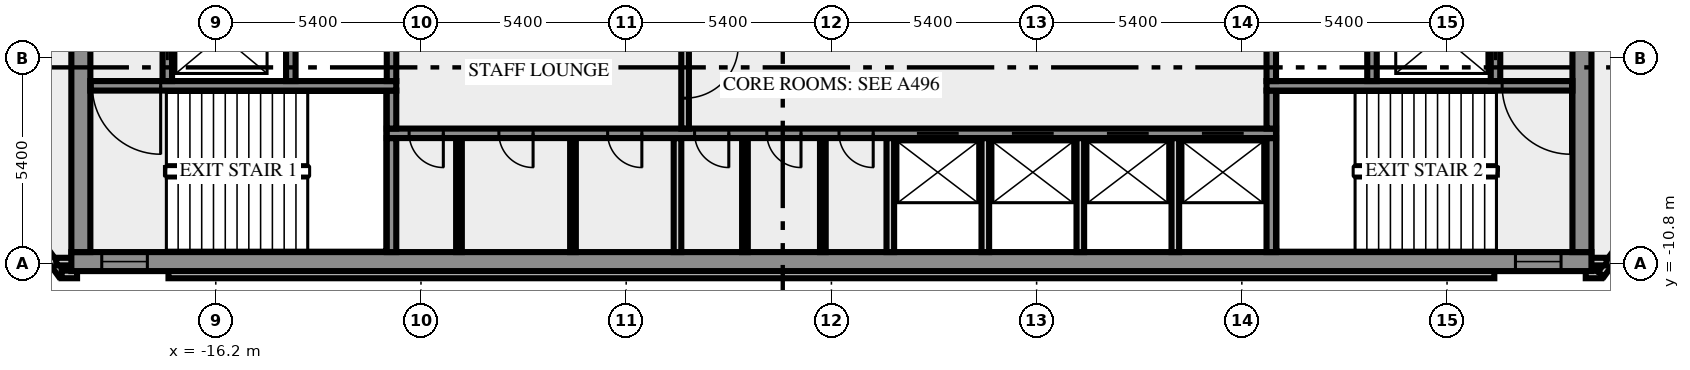
"""IFC4 building model, lengths in metres.
Left out: names, types, materials, properties, quantities, classifications, styles, units other than length and angle.
Written with IfcOpenShell. Run it as: python <this file> out.ifc"""

import sys

from ifc_helpers import new_model, si_unit, direction, frame, frame_2d, origin, place, context, subcontext, project, spatial, rectangle, extrude, element, fill, save


model = new_model("IFC4")
c1 = context("Model", 3, precision=1e-05, world=origin(), true_north=direction((0.0, 1.0)))
c2 = subcontext(c1, "Body", "Model", "MODEL_VIEW")
j1 = project(units=[si_unit("LENGTHUNIT", "METRE"), si_unit("PLANEANGLEUNIT", "RADIAN")], contexts=[c1])
p1 = place(None, origin())
s1 = spatial("IfcSite", under=j1, at=p1, CompositionType="ELEMENT")
p2 = place(p1, origin())
s2 = spatial("IfcBuilding", under=s1, at=p2, CompositionType="ELEMENT")
p3 = place(p2, frame((0.0, 0.0, 218.0)))
s3 = spatial("IfcBuildingStorey", under=s2, at=p3, CompositionType="ELEMENT", Elevation=218.0)
p4 = place(p3, frame((-21.833, -8.909, 0.0), z_axis=(0.0, 0.0, 1.0), x_axis=(0.587766567315, -0.809030569476, 0.0)))
e1 = element("IfcWall", 1, at=p4, inside=s3, PredefinedType="SOLIDWALL", context=c2, shape_type="SweptSolid", body=[
    extrude(rectangle(XDim=2.688, YDim=0.2, at=frame_2d((1.344, 0.0))), origin(), (0.0, 0.0, 1.0), 3.65),
])
p5 = place(p3, frame((-20.256, -11.088, 0.0), z_axis=(0.0, 0.0, 1.0), x_axis=(1.0, 0.0, 0.0)))
e2 = element("IfcWall", 2, at=p5, inside=s3, PredefinedType="SOLIDWALL", context=c2, shape_type="SweptSolid", body=[
    extrude(rectangle(XDim=0.406, YDim=0.2, at=frame_2d((0.203, 0.0))), origin(), (0.0, 0.0, 1.0), 3.65),
])
p6 = place(p3, frame((-17.444, -11.088, 0.0), z_axis=(0.0, 0.0, 1.0), x_axis=(1.0, 0.0, 0.0)))
e3 = element("IfcWall", 3, at=p6, inside=s3, PredefinedType="SOLIDWALL", context=c2, shape_type="SweptSolid", body=[
    extrude(rectangle(XDim=34.888, YDim=0.2, at=frame_2d((17.444, 0.0))), origin(), (0.0, 0.0, 1.0), 3.65),
])
p7 = place(p3, frame((19.85, -11.088, 0.0), z_axis=(0.0, 0.0, 1.0), x_axis=(1.0, 0.0, 0.0)))
e4 = element("IfcWall", 4, at=p7, inside=s3, PredefinedType="SOLIDWALL", context=c2, shape_type="SweptSolid", body=[
    extrude(rectangle(XDim=0.406, YDim=0.2, at=frame_2d((0.203, 0.0))), origin(), (0.0, 0.0, 1.0), 3.65),
])
p8 = place(p3, frame((20.253, -11.083, 0.0), z_axis=(0.0, 0.0, 1.0), x_axis=(0.587766567315, 0.809030569476, 0.0)))
e5 = element("IfcWall", 5, at=p8, inside=s3, PredefinedType="SOLIDWALL", context=c2, shape_type="SweptSolid", body=[
    extrude(rectangle(XDim=2.688, YDim=0.2, at=frame_2d((1.344, 0.0))), origin(), (0.0, 0.0, 1.0), 3.65),
])
for number, where, z_axis, x_axis in (
    (6, (-19.98, -10.75, 0.0), (0.0, 0.0, 1.0), (-1.0, 0.0, 0.0)),
    (7, (19.98, -10.75, 0.0), (0.0, 0.0, 1.0), (1.0, 0.0, 0.0)),
):
    element("IfcWall", number, at=place(p3, frame(where, z_axis=z_axis, x_axis=x_axis)), inside=s3, PredefinedType="SOLIDWALL", context=c2, shape_type="SweptSolid", body=[
        extrude(rectangle(XDim=0.417, YDim=0.2, at=frame_2d((0.208, 0.0))), origin(), (0.0, 0.0, 1.0), 3.65),
    ])
p9 = place(p3, frame((-20.0, -10.75, 0.0), z_axis=(0.0, 0.0, 1.0), x_axis=(1.0, 0.0, 0.0)))
e8 = element("IfcWall", 8, at=p9, inside=s3, PredefinedType="SHEAR", context=c2, shape_type="SweptSolid", body=[
    extrude(rectangle(XDim=40.0, YDim=0.5, at=frame_2d((20.0, 0.0))), origin(), (0.0, 0.0, 1.0), 3.65),
])
p10 = place(p9, frame((0.8, 0.0, 1.0)))
e9 = element("IfcOpeningElement", 9, at=p10, cuts=e8, PredefinedType="OPENING", context=c2, shape_type="SweptSolid", body=[
    extrude(rectangle(XDim=1.2, YDim=1.2, at=frame_2d((0.6, 0.6))), frame((0.0, 0.26, 0.0), z_axis=(0.0, -1.0, 0.0), x_axis=(1.0, 0.0, 0.0)), (0.0, 0.0, 1.0), 0.52),
])
p11 = place(p9, frame((38.0, 0.0, 1.0)))
e10 = element("IfcOpeningElement", 10, at=p11, cuts=e8, PredefinedType="OPENING", context=c2, shape_type="SweptSolid", body=[
    extrude(rectangle(XDim=1.2, YDim=1.2, at=frame_2d((0.6, 0.6))), frame((0.0, 0.26, 0.0), z_axis=(0.0, -1.0, 0.0), x_axis=(1.0, 0.0, 0.0)), (0.0, 0.0, 1.0), 0.52),
])
p12 = place(p3, frame((-19.75, -10.5, 0.0), z_axis=(0.0, 0.0, 1.0), x_axis=(0.0, 1.0, 0.0)))
e11 = element("IfcWall", 11, at=p12, inside=s3, PredefinedType="SHEAR", context=c2, shape_type="SweptSolid", body=[
    extrude(rectangle(XDim=8.8, YDim=0.5, at=frame_2d((4.4, 0.0))), origin(), (0.0, 0.0, 1.0), 3.65),
])
p13 = place(p3, frame((-11.575, -10.5, 0.0), z_axis=(0.0, 0.0, 1.0), x_axis=(0.0, 1.0, 0.0)))
e12 = element("IfcWall", 12, at=p13, inside=s3, PredefinedType="SHEAR", context=c2, shape_type="SweptSolid", body=[
    extrude(rectangle(XDim=3.0, YDim=0.25, at=frame_2d((1.5, 0.0))), origin(), (0.0, 0.0, 1.0), 3.65),
])
for number, where, z_axis, x_axis in (
    (13, (-9.8, -10.5, 0.0), (0.0, 0.0, 1.0), (0.0, 1.0, 0.0)),
    (14, (-6.8, -10.5, 0.0), (0.0, 0.0, 1.0), (0.0, 1.0, 0.0)),
):
    element("IfcWall", number, at=place(p3, frame(where, z_axis=z_axis, x_axis=x_axis)), inside=s3, PredefinedType="PARTITIONING", context=c2, shape_type="SweptSolid", body=[
        extrude(rectangle(XDim=3.0, YDim=0.15, at=frame_2d((1.5, 0.0))), origin(), (0.0, 0.0, 1.0), 3.65),
    ])
p14 = place(p3, frame((-4.05, -10.5, 0.0), z_axis=(0.0, 0.0, 1.0), x_axis=(0.0, 1.0, 0.0)))
e15 = element("IfcWall", 15, at=p14, inside=s3, PredefinedType="SOLIDWALL", context=c2, shape_type="SweptSolid", body=[
    extrude(rectangle(XDim=3.0, YDim=0.2, at=frame_2d((1.5, 0.0))), origin(), (0.0, 0.0, 1.0), 3.65),
])
for number, where, z_axis, x_axis in (
    (16, (-2.275, -10.5, 0.0), (0.0, 0.0, 1.0), (0.0, 1.0, 0.0)),
    (17, (-0.225, -10.5, 0.0), (0.0, 0.0, 1.0), (0.0, 1.0, 0.0)),
):
    element("IfcWall", number, at=place(p3, frame(where, z_axis=z_axis, x_axis=x_axis)), inside=s3, PredefinedType="PARTITIONING", context=c2, shape_type="SweptSolid", body=[
        extrude(rectangle(XDim=3.0, YDim=0.15, at=frame_2d((1.5, 0.0))), origin(), (0.0, 0.0, 1.0), 3.65),
    ])
for number, where, z_axis, x_axis in (
    (18, (1.55, -10.5, 0.0), (0.0, 0.0, 1.0), (0.0, 1.0, 0.0)),
    (19, (4.05, -10.5, 0.0), (0.0, 0.0, 1.0), (0.0, 1.0, 0.0)),
    (20, (6.55, -10.5, 0.0), (0.0, 0.0, 1.0), (0.0, 1.0, 0.0)),
    (21, (9.05, -10.5, 0.0), (0.0, 0.0, 1.0), (0.0, 1.0, 0.0)),
):
    element("IfcWall", number, at=place(p3, frame(where, z_axis=z_axis, x_axis=x_axis)), inside=s3, PredefinedType="SOLIDWALL", context=c2, shape_type="SweptSolid", body=[
        extrude(rectangle(XDim=3.0, YDim=0.2, at=frame_2d((1.5, 0.0))), origin(), (0.0, 0.0, 1.0), 3.65),
    ])
p15 = place(p3, frame((11.575, -10.5, 0.0), z_axis=(0.0, 0.0, 1.0), x_axis=(0.0, 1.0, 0.0)))
e22 = element("IfcWall", 22, at=p15, inside=s3, PredefinedType="SHEAR", context=c2, shape_type="SweptSolid", body=[
    extrude(rectangle(XDim=3.0, YDim=0.25, at=frame_2d((1.5, 0.0))), origin(), (0.0, 0.0, 1.0), 3.65),
])
p16 = place(p3, frame((19.75, -10.5, 0.0), z_axis=(0.0, 0.0, 1.0), x_axis=(0.0, 1.0, 0.0)))
e23 = element("IfcWall", 23, at=p16, inside=s3, PredefinedType="SHEAR", context=c2, shape_type="SweptSolid", body=[
    extrude(rectangle(XDim=8.8, YDim=0.5, at=frame_2d((4.4, 0.0))), origin(), (0.0, 0.0, 1.0), 3.65),
])
p17 = place(p3, frame((11.7, -7.375, 0.0), z_axis=(0.0, 0.0, 1.0), x_axis=(-1.0, 0.0, 0.0)))
e24 = element("IfcWall", 24, at=p17, inside=s3, PredefinedType="SHEAR", context=c2, shape_type="SweptSolid", body=[
    extrude(rectangle(XDim=23.4, YDim=0.25, at=frame_2d((11.7, 0.0))), origin(), (0.0, 0.0, 1.0), 3.65),
])
p18 = place(p17, frame((21.912, 0.0, 0.0)))
e25 = element("IfcOpeningElement", 25, at=p18, cuts=e24, PredefinedType="OPENING", context=c2, shape_type="SweptSolid", body=[
    extrude(rectangle(XDim=0.9, YDim=2.1, at=frame_2d((0.45, 1.05))), frame((0.0, 0.135, 0.0), z_axis=(0.0, -1.0, 0.0), x_axis=(1.0, 0.0, 0.0)), (0.0, 0.0, 1.0), 0.27),
])
p19 = place(p17, frame((19.55, 0.0, 0.0)))
e26 = element("IfcOpeningElement", 26, at=p19, cuts=e24, PredefinedType="OPENING", context=c2, shape_type="SweptSolid", body=[
    extrude(rectangle(XDim=0.9, YDim=2.1, at=frame_2d((0.45, 1.05))), frame((0.0, 0.135, 0.0), z_axis=(0.0, -1.0, 0.0), x_axis=(1.0, 0.0, 0.0)), (0.0, 0.0, 1.0), 0.27),
])
p20 = place(p17, frame((16.688, 0.0, 0.0)))
e27 = element("IfcOpeningElement", 27, at=p20, cuts=e24, PredefinedType="OPENING", context=c2, shape_type="SweptSolid", body=[
    extrude(rectangle(XDim=0.9, YDim=2.1, at=frame_2d((0.45, 1.05))), frame((0.0, 0.135, 0.0), z_axis=(0.0, -1.0, 0.0), x_axis=(1.0, 0.0, 0.0)), (0.0, 0.0, 1.0), 0.27),
])
p21 = place(p17, frame((14.4, 0.0, 0.0)))
e28 = element("IfcOpeningElement", 28, at=p21, cuts=e24, PredefinedType="OPENING", context=c2, shape_type="SweptSolid", body=[
    extrude(rectangle(XDim=0.9, YDim=2.1, at=frame_2d((0.45, 1.05))), frame((0.0, 0.135, 0.0), z_axis=(0.0, -1.0, 0.0), x_axis=(1.0, 0.0, 0.0)), (0.0, 0.0, 1.0), 0.27),
])
p22 = place(p17, frame((12.5, 0.0, 0.0)))
e29 = element("IfcOpeningElement", 29, at=p22, cuts=e24, PredefinedType="OPENING", context=c2, shape_type="SweptSolid", body=[
    extrude(rectangle(XDim=0.9, YDim=2.1, at=frame_2d((0.45, 1.05))), frame((0.0, 0.135, 0.0), z_axis=(0.0, -1.0, 0.0), x_axis=(1.0, 0.0, 0.0)), (0.0, 0.0, 1.0), 0.27),
])
p23 = place(p17, frame((10.6, 0.0, 0.0)))
e30 = element("IfcOpeningElement", 30, at=p23, cuts=e24, PredefinedType="OPENING", context=c2, shape_type="SweptSolid", body=[
    extrude(rectangle(XDim=0.9, YDim=2.1, at=frame_2d((0.45, 1.05))), frame((0.0, 0.135, 0.0), z_axis=(0.0, -1.0, 0.0), x_axis=(1.0, 0.0, 0.0)), (0.0, 0.0, 1.0), 0.27),
])
p24 = place(p17, frame((8.35, 0.0, 0.0)))
e31 = element("IfcOpeningElement", 31, at=p24, cuts=e24, PredefinedType="OPENING", context=c2, shape_type="SweptSolid", body=[
    extrude(rectangle(XDim=1.1, YDim=2.1, at=frame_2d((0.55, 1.05))), frame((0.0, 0.135, 0.0), z_axis=(0.0, -1.0, 0.0), x_axis=(1.0, 0.0, 0.0)), (0.0, 0.0, 1.0), 0.27),
])
p25 = place(p17, frame((5.85, 0.0, 0.0)))
e32 = element("IfcOpeningElement", 32, at=p25, cuts=e24, PredefinedType="OPENING", context=c2, shape_type="SweptSolid", body=[
    extrude(rectangle(XDim=1.1, YDim=2.1, at=frame_2d((0.55, 1.05))), frame((0.0, 0.135, 0.0), z_axis=(0.0, -1.0, 0.0), x_axis=(1.0, 0.0, 0.0)), (0.0, 0.0, 1.0), 0.27),
])
p26 = place(p17, frame((3.35, 0.0, 0.0)))
e33 = element("IfcOpeningElement", 33, at=p26, cuts=e24, PredefinedType="OPENING", context=c2, shape_type="SweptSolid", body=[
    extrude(rectangle(XDim=1.1, YDim=2.1, at=frame_2d((0.55, 1.05))), frame((0.0, 0.135, 0.0), z_axis=(0.0, -1.0, 0.0), x_axis=(1.0, 0.0, 0.0)), (0.0, 0.0, 1.0), 0.27),
])
p27 = place(p17, frame((0.85, 0.0, 0.0)))
e34 = element("IfcOpeningElement", 34, at=p27, cuts=e24, PredefinedType="OPENING", context=c2, shape_type="SweptSolid", body=[
    extrude(rectangle(XDim=1.1, YDim=2.1, at=frame_2d((0.55, 1.05))), frame((0.0, 0.135, 0.0), z_axis=(0.0, -1.0, 0.0), x_axis=(1.0, 0.0, 0.0)), (0.0, 0.0, 1.0), 0.27),
])
p28 = place(p3, frame((-11.575, -7.25, 0.0), z_axis=(0.0, 0.0, 1.0), x_axis=(0.0, 1.0, 0.0)))
e35 = element("IfcWall", 35, at=p28, inside=s3, PredefinedType="SHEAR", context=c2, shape_type="SweptSolid", body=[
    extrude(rectangle(XDim=1.0, YDim=0.25, at=frame_2d((0.5, 0.0))), origin(), (0.0, 0.0, 1.0), 3.65),
])
p29 = place(p3, frame((-3.85, -4.25, 0.0), z_axis=(0.0, 0.0, 1.0), x_axis=(0.0, -1.0, 0.0)))
e36 = element("IfcWall", 36, at=p29, inside=s3, PredefinedType="SOLIDWALL", context=c2, shape_type="SweptSolid", body=[
    extrude(rectangle(XDim=3.0, YDim=0.2, at=frame_2d((1.5, 0.0))), origin(), (0.0, 0.0, 1.0), 3.65),
])
p30 = place(p29, frame((0.8, 0.0, 0.0)))
e37 = element("IfcOpeningElement", 37, at=p30, cuts=e36, PredefinedType="OPENING", context=c2, shape_type="SweptSolid", body=[
    extrude(rectangle(XDim=1.4, YDim=2.1, at=frame_2d((0.7, 1.05))), frame((0.0, 0.11, 0.0), z_axis=(0.0, -1.0, 0.0), x_axis=(1.0, 0.0, 0.0)), (0.0, 0.0, 1.0), 0.22),
])
p31 = place(p3, frame((11.575, -7.25, 0.0), z_axis=(0.0, 0.0, 1.0), x_axis=(0.0, 1.0, 0.0)))
e38 = element("IfcWall", 38, at=p31, inside=s3, PredefinedType="SHEAR", context=c2, shape_type="SweptSolid", body=[
    extrude(rectangle(XDim=1.0, YDim=0.25, at=frame_2d((0.5, 0.0))), origin(), (0.0, 0.0, 1.0), 3.65),
])
p32 = place(p3, frame((-11.45, -6.125, 0.0), z_axis=(0.0, 0.0, 1.0), x_axis=(-1.0, 0.0, 0.0)))
e39 = element("IfcWall", 39, at=p32, inside=s3, PredefinedType="SHEAR", context=c2, shape_type="SweptSolid", body=[
    extrude(rectangle(XDim=8.05, YDim=0.25, at=frame_2d((4.025, 0.0))), origin(), (0.0, 0.0, 1.0), 3.65),
])
p33 = place(p32, frame((6.2, 0.0, 0.0)))
e40 = element("IfcOpeningElement", 40, at=p33, cuts=e39, PredefinedType="OPENING", context=c2, shape_type="SweptSolid", body=[
    extrude(rectangle(XDim=1.8, YDim=2.1, at=frame_2d((0.9, 1.05))), frame((0.0, 0.135, 0.0), z_axis=(0.0, -1.0, 0.0), x_axis=(1.0, 0.0, 0.0)), (0.0, 0.0, 1.0), 0.27),
])
p34 = place(p3, frame((19.5, -6.125, 0.0), z_axis=(0.0, 0.0, 1.0), x_axis=(-1.0, 0.0, 0.0)))
e41 = element("IfcWall", 41, at=p34, inside=s3, PredefinedType="SHEAR", context=c2, shape_type="SweptSolid", body=[
    extrude(rectangle(XDim=8.05, YDim=0.25, at=frame_2d((4.025, 0.0))), origin(), (0.0, 0.0, 1.0), 3.65),
])
p35 = place(p34, frame((0.05, 0.0, 0.0)))
e42 = element("IfcOpeningElement", 42, at=p35, cuts=e41, PredefinedType="OPENING", context=c2, shape_type="SweptSolid", body=[
    extrude(rectangle(XDim=1.8, YDim=2.1, at=frame_2d((0.9, 1.05))), frame((0.0, 0.135, 0.0), z_axis=(0.0, -1.0, 0.0), x_axis=(1.0, 0.0, 0.0)), (0.0, 0.0, 1.0), 0.27),
])
p36 = place(p3, frame((-17.475, -6.0, 0.0), z_axis=(0.0, 0.0, 1.0), x_axis=(0.0, 1.0, 0.0)))
e43 = element("IfcWall", 43, at=p36, inside=s3, PredefinedType="SHEAR", context=c2, shape_type="SweptSolid", body=[
    extrude(rectangle(XDim=4.3, YDim=0.25, at=frame_2d((2.15, 0.0))), origin(), (0.0, 0.0, 1.0), 3.65),
])
p37 = place(p36, frame((0.55, 0.0, 0.0)))
e44 = element("IfcOpeningElement", 44, at=p37, cuts=e43, PredefinedType="OPENING", context=c2, shape_type="SweptSolid", body=[
    extrude(rectangle(XDim=1.3, YDim=2.1, at=frame_2d((0.65, 1.05))), frame((0.0, 0.135, 0.0), z_axis=(0.0, -1.0, 0.0), x_axis=(1.0, 0.0, 0.0)), (0.0, 0.0, 1.0), 0.27),
])
p38 = place(p3, frame((-14.225, -6.0, 0.0), z_axis=(0.0, 0.0, 1.0), x_axis=(0.0, 1.0, 0.0)))
e45 = element("IfcWall", 45, at=p38, inside=s3, PredefinedType="SHEAR", context=c2, shape_type="SweptSolid", body=[
    extrude(rectangle(XDim=4.3, YDim=0.25, at=frame_2d((2.15, 0.0))), origin(), (0.0, 0.0, 1.0), 3.65),
])
for number, where, z_axis, x_axis in (
    (46, (-11.575, -6.0, 0.0), (0.0, 0.0, 1.0), (0.0, 1.0, 0.0)),
    (47, (11.575, -6.0, 0.0), (0.0, 0.0, 1.0), (0.0, 1.0, 0.0)),
):
    element("IfcWall", number, at=place(p3, frame(where, z_axis=z_axis, x_axis=x_axis)), inside=s3, PredefinedType="SHEAR", context=c2, shape_type="SweptSolid", body=[
        extrude(rectangle(XDim=1.75, YDim=0.25, at=frame_2d((0.875, 0.0))), origin(), (0.0, 0.0, 1.0), 3.65),
    ])
p39 = place(p3, frame((14.225, -6.0, 0.0), z_axis=(0.0, 0.0, 1.0), x_axis=(0.0, 1.0, 0.0)))
e48 = element("IfcWall", 48, at=p39, inside=s3, PredefinedType="SHEAR", context=c2, shape_type="SweptSolid", body=[
    extrude(rectangle(XDim=4.3, YDim=0.25, at=frame_2d((2.15, 0.0))), origin(), (0.0, 0.0, 1.0), 3.65),
])
p40 = place(p3, frame((17.475, -6.0, 0.0), z_axis=(0.0, 0.0, 1.0), x_axis=(0.0, 1.0, 0.0)))
e49 = element("IfcWall", 49, at=p40, inside=s3, PredefinedType="SHEAR", context=c2, shape_type="SweptSolid", body=[
    extrude(rectangle(XDim=4.3, YDim=0.25, at=frame_2d((2.15, 0.0))), origin(), (0.0, 0.0, 1.0), 3.65),
])
p41 = place(p40, frame((0.55, 0.0, 0.0)))
e50 = element("IfcOpeningElement", 50, at=p41, cuts=e49, PredefinedType="OPENING", context=c2, shape_type="SweptSolid", body=[
    extrude(rectangle(XDim=1.3, YDim=2.1, at=frame_2d((0.65, 1.05))), frame((0.0, 0.135, 0.0), z_axis=(0.0, -1.0, 0.0), x_axis=(1.0, 0.0, 0.0)), (0.0, 0.0, 1.0), 0.27),
])
p42 = place(p10, origin())
e51 = element("IfcWindow", 51, at=p42, inside=s3, PartitioningType="SINGLE_PANEL", PredefinedType="WINDOW", context=c2, shape_type="SweptSolid", body=[
    extrude(rectangle(XDim=1.2, YDim=1.2, at=frame_2d((0.6, 0.6))), frame((0.0, 0.03, 0.0), z_axis=(0.0, -1.0, 0.0), x_axis=(1.0, 0.0, 0.0)), (0.0, 0.0, 1.0), 0.06),
])
fill(e9, e51)
p43 = place(p11, origin())
e52 = element("IfcWindow", 52, at=p43, inside=s3, PartitioningType="SINGLE_PANEL", PredefinedType="WINDOW", context=c2, shape_type="SweptSolid", body=[
    extrude(rectangle(XDim=1.2, YDim=1.2, at=frame_2d((0.6, 0.6))), frame((0.0, 0.03, 0.0), z_axis=(0.0, -1.0, 0.0), x_axis=(1.0, 0.0, 0.0)), (0.0, 0.0, 1.0), 0.06),
])
fill(e10, e52)
p44 = place(p18, origin())
e53 = element("IfcDoor", 53, at=p44, inside=s3, OperationType="SINGLE_SWING_RIGHT", PredefinedType="DOOR", context=c2, shape_type="SweptSolid", body=[
    extrude(rectangle(XDim=0.9, YDim=2.1, at=frame_2d((0.45, 1.05))), frame((0.0, 0.025, 0.0), z_axis=(0.0, -1.0, 0.0), x_axis=(1.0, 0.0, 0.0)), (0.0, 0.0, 1.0), 0.05),
])
fill(e25, e53)
p45 = place(p19, origin())
e54 = element("IfcDoor", 54, at=p45, inside=s3, OperationType="SINGLE_SWING_RIGHT", PredefinedType="DOOR", context=c2, shape_type="SweptSolid", body=[
    extrude(rectangle(XDim=0.9, YDim=2.1, at=frame_2d((0.45, 1.05))), frame((0.0, 0.025, 0.0), z_axis=(0.0, -1.0, 0.0), x_axis=(1.0, 0.0, 0.0)), (0.0, 0.0, 1.0), 0.05),
])
fill(e26, e54)
p46 = place(p20, origin())
e55 = element("IfcDoor", 55, at=p46, inside=s3, OperationType="SINGLE_SWING_RIGHT", PredefinedType="DOOR", context=c2, shape_type="SweptSolid", body=[
    extrude(rectangle(XDim=0.9, YDim=2.1, at=frame_2d((0.45, 1.05))), frame((0.0, 0.025, 0.0), z_axis=(0.0, -1.0, 0.0), x_axis=(1.0, 0.0, 0.0)), (0.0, 0.0, 1.0), 0.05),
])
fill(e27, e55)
p47 = place(p21, origin())
e56 = element("IfcDoor", 56, at=p47, inside=s3, OperationType="SINGLE_SWING_RIGHT", PredefinedType="DOOR", context=c2, shape_type="SweptSolid", body=[
    extrude(rectangle(XDim=0.9, YDim=2.1, at=frame_2d((0.45, 1.05))), frame((0.0, 0.025, 0.0), z_axis=(0.0, -1.0, 0.0), x_axis=(1.0, 0.0, 0.0)), (0.0, 0.0, 1.0), 0.05),
])
fill(e28, e56)
p48 = place(p22, origin())
e57 = element("IfcDoor", 57, at=p48, inside=s3, OperationType="SINGLE_SWING_RIGHT", PredefinedType="DOOR", context=c2, shape_type="SweptSolid", body=[
    extrude(rectangle(XDim=0.9, YDim=2.1, at=frame_2d((0.45, 1.05))), frame((0.0, 0.025, 0.0), z_axis=(0.0, -1.0, 0.0), x_axis=(1.0, 0.0, 0.0)), (0.0, 0.0, 1.0), 0.05),
])
fill(e29, e57)
p49 = place(p23, origin())
e58 = element("IfcDoor", 58, at=p49, inside=s3, OperationType="SINGLE_SWING_LEFT", PredefinedType="DOOR", context=c2, shape_type="SweptSolid", body=[
    extrude(rectangle(XDim=0.9, YDim=2.1, at=frame_2d((0.45, 1.05))), frame((0.0, 0.025, 0.0), z_axis=(0.0, -1.0, 0.0), x_axis=(1.0, 0.0, 0.0)), (0.0, 0.0, 1.0), 0.05),
])
fill(e30, e58)
p50 = place(p24, origin())
e59 = element("IfcDoor", 59, at=p50, inside=s3, OperationType="DOUBLE_DOOR_SLIDING", PredefinedType="DOOR", context=c2, shape_type="SweptSolid", body=[
    extrude(rectangle(XDim=1.1, YDim=2.1, at=frame_2d((0.55, 1.05))), frame((0.0, 0.025, 0.0), z_axis=(0.0, -1.0, 0.0), x_axis=(1.0, 0.0, 0.0)), (0.0, 0.0, 1.0), 0.05),
])
fill(e31, e59)
p51 = place(p25, origin())
e60 = element("IfcDoor", 60, at=p51, inside=s3, OperationType="DOUBLE_DOOR_SLIDING", PredefinedType="DOOR", context=c2, shape_type="SweptSolid", body=[
    extrude(rectangle(XDim=1.1, YDim=2.1, at=frame_2d((0.55, 1.05))), frame((0.0, 0.025, 0.0), z_axis=(0.0, -1.0, 0.0), x_axis=(1.0, 0.0, 0.0)), (0.0, 0.0, 1.0), 0.05),
])
fill(e32, e60)
p52 = place(p26, origin())
e61 = element("IfcDoor", 61, at=p52, inside=s3, OperationType="DOUBLE_DOOR_SLIDING", PredefinedType="DOOR", context=c2, shape_type="SweptSolid", body=[
    extrude(rectangle(XDim=1.1, YDim=2.1, at=frame_2d((0.55, 1.05))), frame((0.0, 0.025, 0.0), z_axis=(0.0, -1.0, 0.0), x_axis=(1.0, 0.0, 0.0)), (0.0, 0.0, 1.0), 0.05),
])
fill(e33, e61)
p53 = place(p27, origin())
e62 = element("IfcDoor", 62, at=p53, inside=s3, OperationType="DOUBLE_DOOR_SLIDING", PredefinedType="DOOR", context=c2, shape_type="SweptSolid", body=[
    extrude(rectangle(XDim=1.1, YDim=2.1, at=frame_2d((0.55, 1.05))), frame((0.0, 0.025, 0.0), z_axis=(0.0, -1.0, 0.0), x_axis=(1.0, 0.0, 0.0)), (0.0, 0.0, 1.0), 0.05),
])
fill(e34, e62)
p54 = place(p30, origin())
e63 = element("IfcDoor", 63, at=p54, inside=s3, OperationType="DOUBLE_DOOR_SINGLE_SWING", PredefinedType="DOOR", context=c2, shape_type="SweptSolid", body=[
    extrude(rectangle(XDim=1.4, YDim=2.1, at=frame_2d((0.7, 1.05))), frame((0.0, 0.025, 0.0), z_axis=(0.0, -1.0, 0.0), x_axis=(1.0, 0.0, 0.0)), (0.0, 0.0, 1.0), 0.05),
])
fill(e37, e63)
p55 = place(p33, origin())
e64 = element("IfcDoor", 64, at=p55, inside=s3, OperationType="DOUBLE_DOOR_SINGLE_SWING", PredefinedType="DOOR", context=c2, shape_type="SweptSolid", body=[
    extrude(rectangle(XDim=1.8, YDim=2.1, at=frame_2d((0.9, 1.05))), frame((0.0, 0.025, 0.0), z_axis=(0.0, -1.0, 0.0), x_axis=(1.0, 0.0, 0.0)), (0.0, 0.0, 1.0), 0.05),
])
fill(e40, e64)
p56 = place(p35, origin())
e65 = element("IfcDoor", 65, at=p56, inside=s3, OperationType="DOUBLE_DOOR_SINGLE_SWING", PredefinedType="DOOR", context=c2, shape_type="SweptSolid", body=[
    extrude(rectangle(XDim=1.8, YDim=2.1, at=frame_2d((0.9, 1.05))), frame((0.0, 0.025, 0.0), z_axis=(0.0, -1.0, 0.0), x_axis=(1.0, 0.0, 0.0)), (0.0, 0.0, 1.0), 0.05),
])
fill(e42, e65)
p57 = place(p37, origin())
e66 = element("IfcDoor", 66, at=p57, inside=s3, OperationType="DOUBLE_DOOR_SLIDING", PredefinedType="DOOR", context=c2, shape_type="SweptSolid", body=[
    extrude(rectangle(XDim=1.3, YDim=2.1, at=frame_2d((0.65, 1.05))), frame((0.0, 0.025, 0.0), z_axis=(0.0, -1.0, 0.0), x_axis=(1.0, 0.0, 0.0)), (0.0, 0.0, 1.0), 0.05),
])
fill(e44, e66)
p58 = place(p41, origin())
e67 = element("IfcDoor", 67, at=p58, inside=s3, OperationType="DOUBLE_DOOR_SLIDING", PredefinedType="DOOR", context=c2, shape_type="SweptSolid", body=[
    extrude(rectangle(XDim=1.3, YDim=2.1, at=frame_2d((0.65, 1.05))), frame((0.0, 0.025, 0.0), z_axis=(0.0, -1.0, 0.0), x_axis=(1.0, 0.0, 0.0)), (0.0, 0.0, 1.0), 0.05),
])
fill(e50, e67)
save(model, sys.argv[1])
